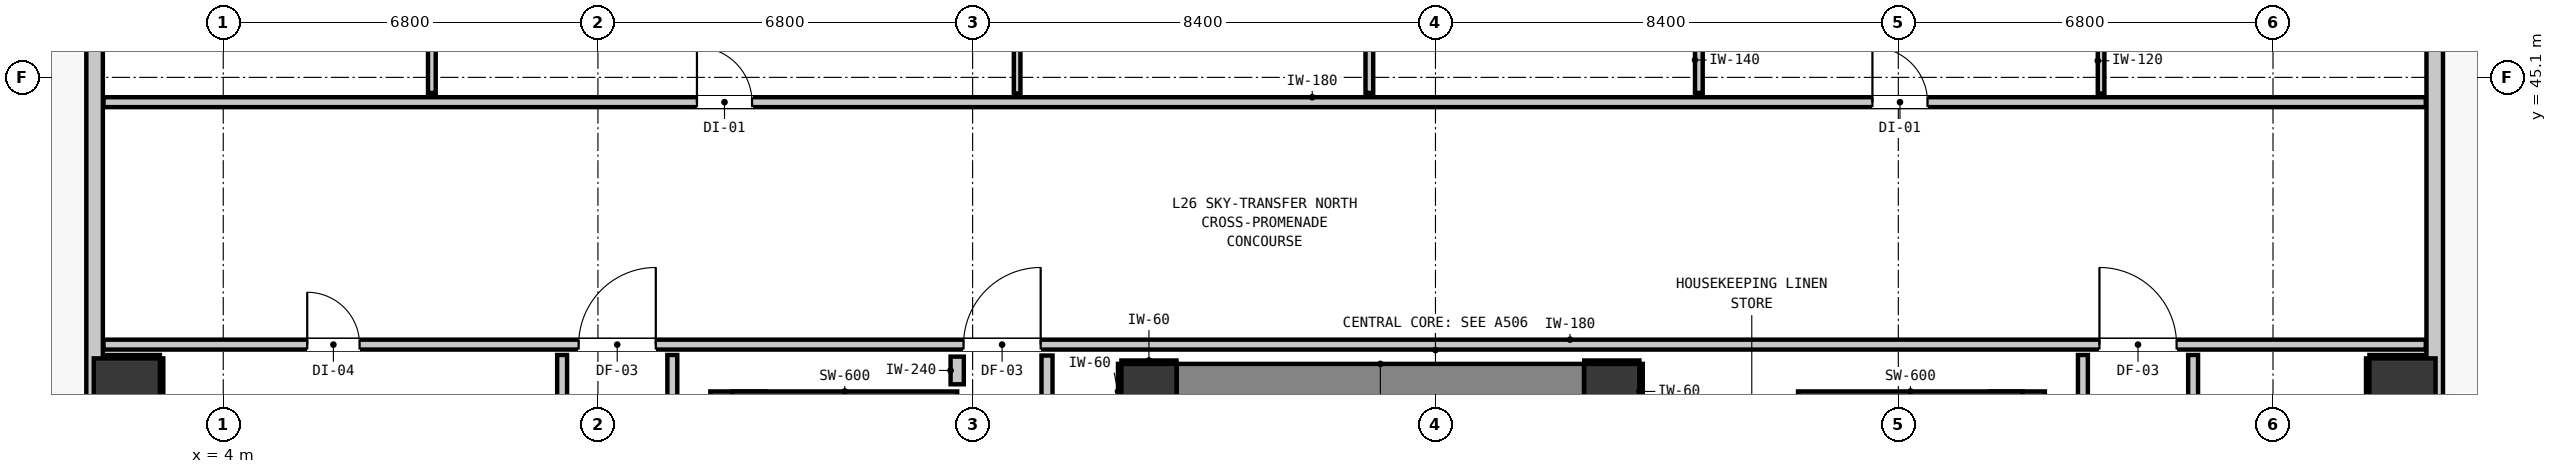
"""IFC4 building model, lengths in metres.
Left out: names, types, materials, properties, quantities, classifications, styles, units other than length and angle.
Written with IfcOpenShell. Run it as: python <this file> out.ifc"""

import sys

from ifc_helpers import new_model, si_unit, direction, frame, frame_2d, origin, origin_2d, place, context, subcontext, project, spatial, rectangle, extrude, element, fill, save


model = new_model("IFC4")
c1 = context("Model", 3, precision=1e-05, world=origin(), true_north=direction((0.0, 1.0)))
c2 = subcontext(c1, "Body", "Model", "MODEL_VIEW")
j1 = project(units=[si_unit("LENGTHUNIT", "METRE"), si_unit("PLANEANGLEUNIT", "RADIAN")], contexts=[c1])
p1 = place(None, origin())
s1 = spatial("IfcSite", under=j1, at=p1, CompositionType="ELEMENT")
p2 = place(p1, origin())
s2 = spatial("IfcBuilding", under=s1, at=p2, CompositionType="ELEMENT")
p3 = place(p2, frame((0.0, 0.0, 92.8)))
s3 = spatial("IfcBuildingStorey", under=s2, at=p3, CompositionType="ELEMENT", Elevation=92.8)
for number, where, z_axis, x_axis in (
    (1, (20.8, 39.4, 0.0), (0.0, 0.0, 1.0), (1.0, 0.0, 0.0)),
    (2, (29.2, 39.4, 0.0), (0.0, 0.0, 1.0), (1.0, 0.0, 0.0)),
):
    element("IfcColumn", number, at=place(p3, frame(where, z_axis=z_axis, x_axis=x_axis)), inside=s3, PredefinedType="COLUMN", context=c2, shape_type="SweptSolid", body=[
        extrude(rectangle(XDim=1.0, YDim=1.0, at=origin_2d()), origin(), (0.0, 0.0, 1.0), 3.32),
    ])
p4 = place(p3, frame((13.34, 31.205, 0.0), z_axis=(0.0, 0.0, 1.0), x_axis=(0.0, 1.0, 0.0)))
e3 = element("IfcWall", 3, at=p4, inside=s3, PredefinedType="SHEAR", context=c2, shape_type="SweptSolid", body=[
    extrude(rectangle(XDim=8.195, YDim=1.0, at=frame_2d((4.097, 0.0))), origin(), (0.0, 0.0, 1.0), 3.32),
])
p5 = place(p3, frame((13.24, 39.1, 0.0), z_axis=(0.0, 0.0, 1.0), x_axis=(1.0, 0.0, 0.0)))
e4 = element("IfcWall", 4, at=p5, inside=s3, PredefinedType="SHEAR", context=c2, shape_type="SweptSolid", body=[
    extrude(rectangle(XDim=4.08, YDim=0.6, at=frame_2d((2.04, 0.0))), origin(), (0.0, 0.0, 1.0), 3.32),
])
p6 = place(p3, frame((36.56, 31.205, 0.0), z_axis=(0.0, 0.0, 1.0), x_axis=(0.0, 1.0, 0.0)))
e5 = element("IfcWall", 5, at=p6, inside=s3, PredefinedType="SHEAR", context=c2, shape_type="SweptSolid", body=[
    extrude(rectangle(XDim=8.195, YDim=1.0, at=frame_2d((4.097, 0.0))), origin(), (0.0, 0.0, 1.0), 3.32),
])
p7 = place(p3, frame((32.58, 39.1, 0.0), z_axis=(0.0, 0.0, 1.0), x_axis=(1.0, 0.0, 0.0)))
e6 = element("IfcWall", 6, at=p7, inside=s3, PredefinedType="SHEAR", context=c2, shape_type="SweptSolid", body=[
    extrude(rectangle(XDim=4.08, YDim=0.6, at=frame_2d((2.04, 0.0))), origin(), (0.0, 0.0, 1.0), 3.32),
])
p8 = place(p3, frame((21.305, 39.4, 0.0), z_axis=(0.0, 0.0, 1.0), x_axis=(1.0, 0.0, 0.0)))
e7 = element("IfcWall", 7, at=p8, inside=s3, PredefinedType="SHEAR", context=c2, shape_type="SweptSolid", body=[
    extrude(rectangle(XDim=7.39, YDim=1.0, at=frame_2d((3.695, 0.0))), origin(), (0.0, 0.0, 1.0), 3.32),
])
for number, where, z_axis, x_axis in (
    (8, (2.25, 39.4, 0.0), (0.0, 0.0, 1.0), (1.0, 0.0, 0.0)),
    (9, (43.55, 39.4, 0.0), (0.0, 0.0, 1.0), (1.0, 0.0, 0.0)),
):
    element("IfcColumn", number, at=place(p3, frame(where, z_axis=z_axis, x_axis=x_axis)), inside=s3, PredefinedType="COLUMN", context=c2, shape_type="SweptSolid", body=[
        extrude(rectangle(XDim=1.2, YDim=1.2, at=origin_2d()), origin(), (0.0, 0.0, 1.0), 3.32),
    ])
p9 = place(p3, frame((1.665, 16.365, 0.0), z_axis=(0.0, 0.0, 1.0), x_axis=(0.0, 1.0, 0.0)))
e10 = element("IfcWall", 10, at=p9, inside=s3, PredefinedType="STANDARD", context=c2, shape_type="SweptSolid", body=[
    extrude(rectangle(XDim=34.67, YDim=0.3, at=frame_2d((17.335, 0.0))), origin(), (0.0, 0.0, 1.0), 3.06),
])
p10 = place(p9, frame((0.901, 0.0, 0.0)))
e11 = element("IfcOpeningElement", 11, at=p10, cuts=e10, PredefinedType="OPENING", context=c2, shape_type="SweptSolid", body=[
    extrude(rectangle(XDim=1.0, YDim=2.15, at=frame_2d((0.5, 1.075))), frame((0.0, 0.16, 0.0), z_axis=(0.0, -1.0, 0.0), x_axis=(1.0, 0.0, 0.0)), (0.0, 0.0, 1.0), 0.32),
])
p11 = place(p9, frame((32.314, 0.0, 0.85)))
e12 = element("IfcOpeningElement", 12, at=p11, cuts=e10, PredefinedType="OPENING", context=c2, shape_type="SweptSolid", body=[
    extrude(rectangle(XDim=2.1, YDim=1.9, at=frame_2d((1.05, 0.95))), frame((0.0, 0.16, 0.0), z_axis=(0.0, -1.0, 0.0), x_axis=(1.0, 0.0, 0.0)), (0.0, 0.0, 1.0), 0.32),
])
p12 = place(p3, frame((44.135, 51.035, 0.0), z_axis=(0.0, 0.0, 1.0), x_axis=(0.0, -1.0, 0.0)))
e13 = element("IfcWall", 13, at=p12, inside=s3, PredefinedType="STANDARD", context=c2, shape_type="SweptSolid", body=[
    extrude(rectangle(XDim=34.67, YDim=0.3, at=frame_2d((17.335, 0.0))), origin(), (0.0, 0.0, 1.0), 3.06),
])
p13 = place(p12, frame((0.901, 0.0, 0.0)))
e14 = element("IfcOpeningElement", 14, at=p13, cuts=e13, PredefinedType="OPENING", context=c2, shape_type="SweptSolid", body=[
    extrude(rectangle(XDim=1.0, YDim=2.15, at=frame_2d((0.5, 1.075))), frame((0.0, 0.16, 0.0), z_axis=(0.0, -1.0, 0.0), x_axis=(1.0, 0.0, 0.0)), (0.0, 0.0, 1.0), 0.32),
])
p14 = place(p12, frame((32.083, 0.0, 0.85)))
e15 = element("IfcOpeningElement", 15, at=p14, cuts=e13, PredefinedType="OPENING", context=c2, shape_type="SweptSolid", body=[
    extrude(rectangle(XDim=2.1, YDim=1.9, at=frame_2d((1.05, 0.95))), frame((0.0, 0.16, 0.0), z_axis=(0.0, -1.0, 0.0), x_axis=(1.0, 0.0, 0.0)), (0.0, 0.0, 1.0), 0.32),
])
p15 = place(p12, frame((21.76, 0.0, 0.85)))
e16 = element("IfcOpeningElement", 16, at=p15, cuts=e13, PredefinedType="OPENING", context=c2, shape_type="SweptSolid", body=[
    extrude(rectangle(XDim=2.1, YDim=1.9, at=frame_2d((1.05, 0.95))), frame((0.0, 0.16, 0.0), z_axis=(0.0, -1.0, 0.0), x_axis=(1.0, 0.0, 0.0)), (0.0, 0.0, 1.0), 0.32),
])
p16 = place(p3, frame((1.827, 40.25, 0.0), z_axis=(0.0, 0.0, 1.0), x_axis=(1.0, 0.0, 0.0)))
e17 = element("IfcWall", 17, at=p16, inside=s3, PredefinedType="PARTITIONING", context=c2, shape_type="SweptSolid", body=[
    extrude(rectangle(XDim=42.146, YDim=0.18, at=frame_2d((21.073, 0.0))), origin(), (0.0, 0.0, 1.0), 3.06),
])
p17 = place(p16, frame((15.608, 0.0, 0.0)))
e18 = element("IfcOpeningElement", 18, at=p17, cuts=e17, PredefinedType="OPENING", context=c2, shape_type="SweptSolid", body=[
    extrude(rectangle(XDim=1.4, YDim=2.15, at=frame_2d((0.7, 1.075))), frame((0.0, 0.1, 0.0), z_axis=(0.0, -1.0, 0.0), x_axis=(1.0, 0.0, 0.0)), (0.0, 0.0, 1.0), 0.2),
])
p18 = place(p16, frame((8.623, 0.0, 0.0)))
e19 = element("IfcOpeningElement", 19, at=p18, cuts=e17, PredefinedType="OPENING", context=c2, shape_type="SweptSolid", body=[
    extrude(rectangle(XDim=1.4, YDim=2.15, at=frame_2d((0.7, 1.075))), frame((0.0, 0.1, 0.0), z_axis=(0.0, -1.0, 0.0), x_axis=(1.0, 0.0, 0.0)), (0.0, 0.0, 1.0), 0.2),
])
p19 = place(p16, frame((36.223, 0.0, 0.0)))
e20 = element("IfcOpeningElement", 20, at=p19, cuts=e17, PredefinedType="OPENING", context=c2, shape_type="SweptSolid", body=[
    extrude(rectangle(XDim=1.4, YDim=2.15, at=frame_2d((0.7, 1.075))), frame((0.0, 0.1, 0.0), z_axis=(0.0, -1.0, 0.0), x_axis=(1.0, 0.0, 0.0)), (0.0, 0.0, 1.0), 0.2),
])
p20 = place(p16, frame((3.697, 0.0, 0.0)))
e21 = element("IfcOpeningElement", 21, at=p20, cuts=e17, PredefinedType="OPENING", context=c2, shape_type="SweptSolid", body=[
    extrude(rectangle(XDim=0.95, YDim=2.1, at=frame_2d((0.475, 1.05))), frame((0.0, 0.1, 0.0), z_axis=(0.0, -1.0, 0.0), x_axis=(1.0, 0.0, 0.0)), (0.0, 0.0, 1.0), 0.2),
])
p21 = place(p3, frame((1.827, 44.65, 0.0), z_axis=(0.0, 0.0, 1.0), x_axis=(1.0, 0.0, 0.0)))
e22 = element("IfcWall", 22, at=p21, inside=s3, PredefinedType="PARTITIONING", context=c2, shape_type="SweptSolid", body=[
    extrude(rectangle(XDim=42.146, YDim=0.18, at=frame_2d((21.073, 0.0))), origin(), (0.0, 0.0, 1.0), 3.06),
])
p22 = place(p21, frame((10.77, 0.0, 0.0)))
e23 = element("IfcOpeningElement", 23, at=p22, cuts=e22, PredefinedType="OPENING", context=c2, shape_type="SweptSolid", body=[
    extrude(rectangle(XDim=1.0, YDim=2.15, at=frame_2d((0.5, 1.075))), frame((0.0, 0.1, 0.0), z_axis=(0.0, -1.0, 0.0), x_axis=(1.0, 0.0, 0.0)), (0.0, 0.0, 1.0), 0.2),
])
p23 = place(p21, frame((32.103, 0.0, 0.0)))
e24 = element("IfcOpeningElement", 24, at=p23, cuts=e22, PredefinedType="OPENING", context=c2, shape_type="SweptSolid", body=[
    extrude(rectangle(XDim=1.0, YDim=2.15, at=frame_2d((0.5, 1.075))), frame((0.0, 0.1, 0.0), z_axis=(0.0, -1.0, 0.0), x_axis=(1.0, 0.0, 0.0)), (0.0, 0.0, 1.0), 0.2),
])
p24 = place(p3, frame((17.32, 39.53, 0.0), z_axis=(0.0, 0.0, 1.0), x_axis=(0.0, 1.0, 0.0)))
e25 = element("IfcWall", 25, at=p24, inside=s3, PredefinedType="PARTITIONING", context=c2, shape_type="SweptSolid", body=[
    extrude(rectangle(XDim=0.502, YDim=0.24, at=frame_2d((0.251, 0.0))), origin(), (0.0, 0.0, 1.0), 3.06),
])
p25 = place(p3, frame((18.95, 38.918, 0.0), z_axis=(0.0, 0.0, 1.0), x_axis=(0.0, 1.0, 0.0)))
e26 = element("IfcWall", 26, at=p25, inside=s3, PredefinedType="PARTITIONING", context=c2, shape_type="SweptSolid", body=[
    extrude(rectangle(XDim=1.134, YDim=0.2, at=frame_2d((0.567, 0.0))), origin(), (0.0, 0.0, 1.0), 3.06),
])
p26 = place(p3, frame((10.15, 36.768, 0.0), z_axis=(0.0, 0.0, 1.0), x_axis=(0.0, 1.0, 0.0)))
e27 = element("IfcWall", 27, at=p26, inside=s3, PredefinedType="PARTITIONING", context=c2, shape_type="SweptSolid", body=[
    extrude(rectangle(XDim=3.294, YDim=0.18, at=frame_2d((1.647, 0.0))), origin(), (0.0, 0.0, 1.0), 3.06),
])
for number, where, z_axis, x_axis in (
    (28, (12.15, 21.368, 0.0), (0.0, 0.0, 1.0), (0.0, 1.0, 0.0)),
    (29, (37.75, 21.368, 0.0), (0.0, 0.0, 1.0), (0.0, 1.0, 0.0)),
):
    element("IfcWall", number, at=place(p3, frame(where, z_axis=z_axis, x_axis=x_axis)), inside=s3, PredefinedType="PARTITIONING", context=c2, shape_type="SweptSolid", body=[
        extrude(rectangle(XDim=18.694, YDim=0.18, at=frame_2d((9.347, 0.0))), origin(), (0.0, 0.0, 1.0), 3.06),
    ])
p27 = place(p3, frame((39.75, 35.05, 0.0), z_axis=(0.0, 0.0, 1.0), x_axis=(0.0, 1.0, 0.0)))
e30 = element("IfcWall", 30, at=p27, inside=s3, PredefinedType="PARTITIONING", context=c2, shape_type="SweptSolid", body=[
    extrude(rectangle(XDim=5.012, YDim=0.18, at=frame_2d((2.506, 0.0))), origin(), (0.0, 0.0, 1.0), 3.06),
])
p28 = place(p3, frame((7.786, 44.818, 0.0), z_axis=(0.0, 0.0, 1.0), x_axis=(0.0, 1.0, 0.0)))
e31 = element("IfcWall", 31, at=p28, inside=s3, PredefinedType="PARTITIONING", context=c2, shape_type="SweptSolid", body=[
    extrude(rectangle(XDim=3.447, YDim=0.14, at=frame_2d((1.723, 0.0))), origin(), (0.0, 0.0, 1.0), 3.06),
])
p29 = place(p28, frame((1.284, 0.0, 0.0)))
e32 = element("IfcOpeningElement", 32, at=p29, cuts=e31, PredefinedType="OPENING", context=c2, shape_type="SweptSolid", body=[
    extrude(rectangle(XDim=0.86, YDim=2.02, at=frame_2d((0.43, 1.01))), frame((0.0, 0.08, 0.0), z_axis=(0.0, -1.0, 0.0), x_axis=(1.0, 0.0, 0.0)), (0.0, 0.0, 1.0), 0.16),
])
p30 = place(p3, frame((24.8, 44.818, 0.0), z_axis=(0.0, 0.0, 1.0), x_axis=(0.0, 1.0, 0.0)))
e33 = element("IfcWall", 33, at=p30, inside=s3, PredefinedType="PARTITIONING", context=c2, shape_type="SweptSolid", body=[
    extrude(rectangle(XDim=3.447, YDim=0.14, at=frame_2d((1.723, 0.0))), origin(), (0.0, 0.0, 1.0), 3.06),
])
p31 = place(p3, frame((30.78, 44.818, 0.0), z_axis=(0.0, 0.0, 1.0), x_axis=(0.0, 1.0, 0.0)))
e34 = element("IfcWall", 34, at=p31, inside=s3, PredefinedType="PARTITIONING", context=c2, shape_type="SweptSolid", body=[
    extrude(rectangle(XDim=3.447, YDim=0.14, at=frame_2d((1.723, 0.0))), origin(), (0.0, 0.0, 1.0), 3.06),
])
p32 = place(p31, frame((1.296, 0.0, 0.0)))
e35 = element("IfcOpeningElement", 35, at=p32, cuts=e34, PredefinedType="OPENING", context=c2, shape_type="SweptSolid", body=[
    extrude(rectangle(XDim=0.86, YDim=2.02, at=frame_2d((0.43, 1.01))), frame((0.0, 0.08, 0.0), z_axis=(0.0, -1.0, 0.0), x_axis=(1.0, 0.0, 0.0)), (0.0, 0.0, 1.0), 0.16),
])
p33 = place(p3, frame((18.408, 44.808, 0.0), z_axis=(0.0, 0.0, 1.0), x_axis=(0.0, 1.0, 0.0)))
e36 = element("IfcWall", 36, at=p33, inside=s3, PredefinedType="PARTITIONING", context=c2, shape_type="SweptSolid", body=[
    extrude(rectangle(XDim=3.467, YDim=0.12, at=frame_2d((1.733, 0.0))), origin(), (0.0, 0.0, 1.0), 3.06),
])
p34 = place(p33, frame((1.274, 0.0, 0.0)))
e37 = element("IfcOpeningElement", 37, at=p34, cuts=e36, PredefinedType="OPENING", context=c2, shape_type="SweptSolid", body=[
    extrude(rectangle(XDim=0.9, YDim=2.1, at=frame_2d((0.45, 1.05))), frame((0.0, 0.07, 0.0), z_axis=(0.0, -1.0, 0.0), x_axis=(1.0, 0.0, 0.0)), (0.0, 0.0, 1.0), 0.14),
])
p35 = place(p3, frame((38.08, 44.808, 0.0), z_axis=(0.0, 0.0, 1.0), x_axis=(0.0, 1.0, 0.0)))
e38 = element("IfcWall", 38, at=p35, inside=s3, PredefinedType="PARTITIONING", context=c2, shape_type="SweptSolid", body=[
    extrude(rectangle(XDim=3.467, YDim=0.12, at=frame_2d((1.733, 0.0))), origin(), (0.0, 0.0, 1.0), 3.06),
])
p36 = place(p35, frame((1.286, 0.0, 0.0)))
e39 = element("IfcOpeningElement", 39, at=p36, cuts=e38, PredefinedType="OPENING", context=c2, shape_type="SweptSolid", body=[
    extrude(rectangle(XDim=0.9, YDim=2.1, at=frame_2d((0.45, 1.05))), frame((0.0, 0.07, 0.0), z_axis=(0.0, -1.0, 0.0), x_axis=(1.0, 0.0, 0.0)), (0.0, 0.0, 1.0), 0.14),
])
for number, where, z_axis, x_axis in (
    (40, (20.3, 39.932, 0.0), (0.0, 0.0, 1.0), (1.0, 0.0, 0.0)),
    (41, (20.268, 38.9, 0.0), (0.0, 0.0, 1.0), (0.0, 1.0, 0.0)),
    (42, (28.7, 39.932, 0.0), (0.0, 0.0, 1.0), (1.0, 0.0, 0.0)),
    (43, (29.732, 38.9, 0.0), (0.0, 0.0, 1.0), (0.0, 1.0, 0.0)),
):
    element("IfcWall", number, at=place(p3, frame(where, z_axis=z_axis, x_axis=x_axis)), inside=s3, PredefinedType="PARTITIONING", context=c2, shape_type="SweptSolid", body=[
        extrude(rectangle(XDim=1.0, YDim=0.06, at=frame_2d((0.5, 0.0))), origin(), (0.0, 0.0, 1.0), 1.45),
    ])
p37 = place(p3, frame((1.83, 40.032, 0.0), z_axis=(0.0, 0.0, 1.0), x_axis=(1.0, 0.0, 0.0)))
e44 = element("IfcWall", 44, at=p37, inside=s3, PredefinedType="PARTITIONING", context=c2, shape_type="SweptSolid", body=[
    extrude(rectangle(XDim=1.02, YDim=0.06, at=frame_2d((0.51, 0.0))), origin(), (0.0, 0.0, 1.0), 1.45),
])
p38 = place(p3, frame((2.882, 38.8, 0.0), z_axis=(0.0, 0.0, 1.0), x_axis=(0.0, 1.0, 0.0)))
e45 = element("IfcWall", 45, at=p38, inside=s3, PredefinedType="PARTITIONING", context=c2, shape_type="SweptSolid", body=[
    extrude(rectangle(XDim=1.2, YDim=0.06, at=frame_2d((0.6, 0.0))), origin(), (0.0, 0.0, 1.0), 1.45),
])
p39 = place(p3, frame((42.95, 40.032, 0.0), z_axis=(0.0, 0.0, 1.0), x_axis=(1.0, 0.0, 0.0)))
e46 = element("IfcWall", 46, at=p39, inside=s3, PredefinedType="PARTITIONING", context=c2, shape_type="SweptSolid", body=[
    extrude(rectangle(XDim=1.02, YDim=0.06, at=frame_2d((0.51, 0.0))), origin(), (0.0, 0.0, 1.0), 1.45),
])
p40 = place(p3, frame((42.918, 38.8, 0.0), z_axis=(0.0, 0.0, 1.0), x_axis=(0.0, 1.0, 0.0)))
e47 = element("IfcWall", 47, at=p40, inside=s3, PredefinedType="PARTITIONING", context=c2, shape_type="SweptSolid", body=[
    extrude(rectangle(XDim=1.2, YDim=0.06, at=frame_2d((0.6, 0.0))), origin(), (0.0, 0.0, 1.0), 1.45),
])
p41 = place(p17, origin())
e48 = element("IfcDoor", 48, at=p41, inside=s3, OperationType="SINGLE_SWING_RIGHT", PredefinedType="DOOR", context=c2, shape_type="SweptSolid", body=[
    extrude(rectangle(XDim=1.4, YDim=2.15, at=frame_2d((0.7, 1.075))), frame((0.0, 0.025, 0.0), z_axis=(0.0, -1.0, 0.0), x_axis=(1.0, 0.0, 0.0)), (0.0, 0.0, 1.0), 0.05),
])
fill(e18, e48)
p42 = place(p18, origin())
e49 = element("IfcDoor", 49, at=p42, inside=s3, OperationType="SINGLE_SWING_RIGHT", PredefinedType="DOOR", context=c2, shape_type="SweptSolid", body=[
    extrude(rectangle(XDim=1.4, YDim=2.15, at=frame_2d((0.7, 1.075))), frame((0.0, 0.025, 0.0), z_axis=(0.0, -1.0, 0.0), x_axis=(1.0, 0.0, 0.0)), (0.0, 0.0, 1.0), 0.05),
])
fill(e19, e49)
p43 = place(p19, origin())
e50 = element("IfcDoor", 50, at=p43, inside=s3, OperationType="SINGLE_SWING_LEFT", PredefinedType="DOOR", context=c2, shape_type="SweptSolid", body=[
    extrude(rectangle(XDim=1.4, YDim=2.15, at=frame_2d((0.7, 1.075))), frame((0.0, 0.025, 0.0), z_axis=(0.0, -1.0, 0.0), x_axis=(1.0, 0.0, 0.0)), (0.0, 0.0, 1.0), 0.05),
])
fill(e20, e50)
p44 = place(p20, origin())
e51 = element("IfcDoor", 51, at=p44, inside=s3, OperationType="SINGLE_SWING_LEFT", PredefinedType="DOOR", context=c2, shape_type="SweptSolid", body=[
    extrude(rectangle(XDim=0.95, YDim=2.1, at=frame_2d((0.475, 1.05))), frame((0.0, 0.025, 0.0), z_axis=(0.0, -1.0, 0.0), x_axis=(1.0, 0.0, 0.0)), (0.0, 0.0, 1.0), 0.05),
])
fill(e21, e51)
p45 = place(p22, origin())
e52 = element("IfcDoor", 52, at=p45, inside=s3, OperationType="SINGLE_SWING_LEFT", PredefinedType="DOOR", context=c2, shape_type="SweptSolid", body=[
    extrude(rectangle(XDim=1.0, YDim=2.15, at=frame_2d((0.5, 1.075))), frame((0.0, 0.025, 0.0), z_axis=(0.0, -1.0, 0.0), x_axis=(1.0, 0.0, 0.0)), (0.0, 0.0, 1.0), 0.05),
])
fill(e23, e52)
p46 = place(p23, origin())
e53 = element("IfcDoor", 53, at=p46, inside=s3, OperationType="SINGLE_SWING_LEFT", PredefinedType="DOOR", context=c2, shape_type="SweptSolid", body=[
    extrude(rectangle(XDim=1.0, YDim=2.15, at=frame_2d((0.5, 1.075))), frame((0.0, 0.025, 0.0), z_axis=(0.0, -1.0, 0.0), x_axis=(1.0, 0.0, 0.0)), (0.0, 0.0, 1.0), 0.05),
])
fill(e24, e53)
save(model, sys.argv[1])
